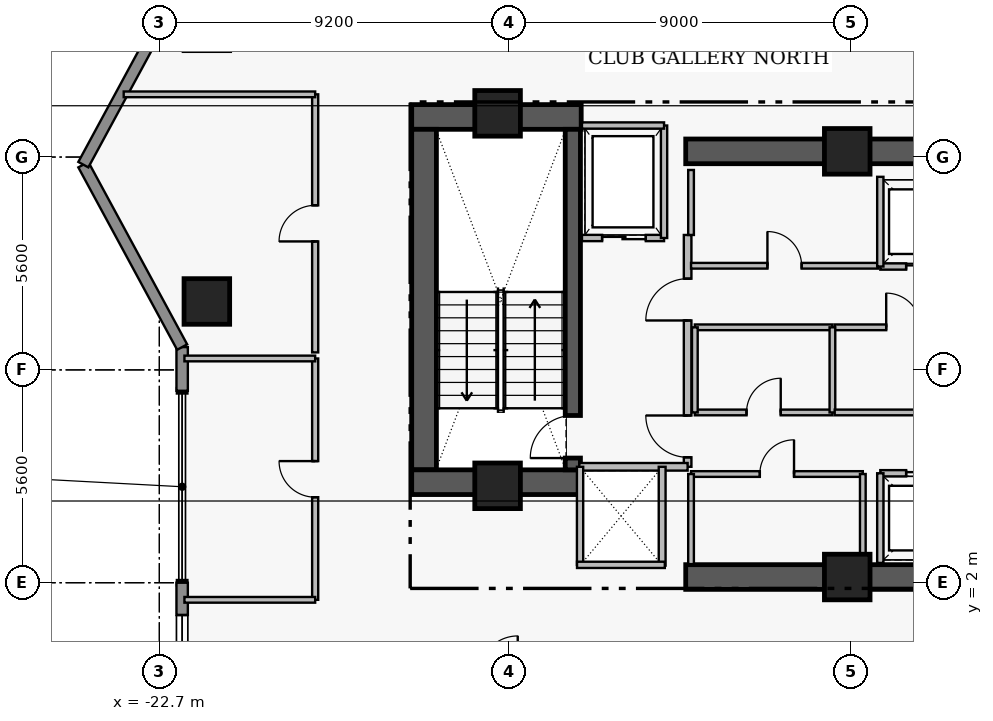
"""IFC4 building model, lengths in metres.
Left out: names, types, materials, properties, quantities, classifications, styles, units other than length and angle.
Written with IfcOpenShell. Run it as: python <this file> out.ifc"""

import sys

from ifc_helpers import new_model, si_unit, direction, frame, frame_2d, origin, origin_2d, place, context, subcontext, project, spatial, rectangle, extrude, element, fill, save


model = new_model("IFC4")
c1 = context("Model", 3, precision=1e-05, world=origin(), true_north=direction((0.0, 1.0)))
c2 = subcontext(c1, "Body", "Model", "MODEL_VIEW")
j1 = project(units=[si_unit("LENGTHUNIT", "METRE"), si_unit("PLANEANGLEUNIT", "RADIAN")], contexts=[c1])
p1 = place(None, origin())
s1 = spatial("IfcSite", under=j1, at=p1, CompositionType="ELEMENT")
p2 = place(p1, origin())
s2 = spatial("IfcBuilding", under=s1, at=p2, CompositionType="ELEMENT")
p3 = place(p2, frame((0.0, 0.0, 203.65)))
s3 = spatial("IfcBuildingStorey", under=s2, at=p3, CompositionType="ELEMENT", Elevation=203.65)
p4 = place(p3, frame((-16.06, 14.255, 0.0), z_axis=(0.0, 0.0, 1.0), x_axis=(1.0, 0.0, 0.0)))
e1 = element("IfcWall", 1, at=p4, inside=s3, PredefinedType="SHEAR", context=c2, shape_type="SweptSolid", body=[
    extrude(rectangle(XDim=4.46, YDim=0.65, at=frame_2d((2.23, 0.0))), origin(), (0.0, 0.0, 1.0), 3.56),
])
p5 = place(p3, frame((-15.735, 4.97, 0.0), z_axis=(0.0, 0.0, 1.0), x_axis=(0.0, 1.0, 0.0)))
e2 = element("IfcWall", 2, at=p5, inside=s3, PredefinedType="SHEAR", context=c2, shape_type="SweptSolid", body=[
    extrude(rectangle(XDim=8.96, YDim=0.65, at=frame_2d((4.48, 0.0))), origin(), (0.0, 0.0, 1.0), 3.56),
])
p6 = place(p3, frame((-16.06, 4.645, 0.0), z_axis=(0.0, 0.0, 1.0), x_axis=(1.0, 0.0, 0.0)))
e3 = element("IfcWall", 3, at=p6, inside=s3, PredefinedType="SHEAR", context=c2, shape_type="SweptSolid", body=[
    extrude(rectangle(XDim=4.46, YDim=0.65, at=frame_2d((2.23, 0.0))), origin(), (0.0, 0.0, 1.0), 3.56),
])
for number, where, z_axis, x_axis in (
    (4, (-8.85, 2.15, 0.0), (0.0, 0.0, 1.0), (1.0, 0.0, 0.0)),
    (5, (-8.85, 13.35, 0.0), (0.0, 0.0, 1.0), (1.0, 0.0, 0.0)),
):
    element("IfcWall", number, at=place(p3, frame(where, z_axis=z_axis, x_axis=x_axis)), inside=s3, PredefinedType="SHEAR", context=c2, shape_type="SweptSolid", body=[
        extrude(rectangle(XDim=7.6, YDim=0.65, at=frame_2d((3.8, 0.0))), origin(), (0.0, 0.0, 1.0), 3.53),
    ])
p7 = place(p3, frame((-11.82, 4.97, 0.0), z_axis=(0.0, 0.0, 1.0), x_axis=(0.0, 1.0, 0.0)))
e6 = element("IfcWall", 6, at=p7, inside=s3, PredefinedType="SHEAR", context=c2, shape_type="SweptSolid", body=[
    extrude(rectangle(XDim=8.96, YDim=0.4, at=frame_2d((4.48, 0.0))), origin(), (0.0, 0.0, 1.0), 3.56),
])
p8 = place(p7, frame((0.31, 0.0, 0.0)))
e7 = element("IfcOpeningElement", 7, at=p8, cuts=e6, PredefinedType="OPENING", context=c2, shape_type="SweptSolid", body=[
    extrude(rectangle(XDim=1.12, YDim=2.22, at=frame_2d((0.56, 1.11))), frame((0.0, 0.21, 0.0), z_axis=(0.0, -1.0, 0.0), x_axis=(1.0, 0.0, 0.0)), (0.0, 0.0, 1.0), 0.42),
])
for number, where, z_axis, x_axis in (
    (8, (-13.8, 14.35, 0.0), (0.0, 0.0, 1.0), (1.0, 0.0, 0.0)),
    (9, (-4.6, 13.35, 0.0), (0.0, 0.0, 1.0), (1.0, 0.0, 0.0)),
    (10, (-13.8, 4.55, 0.0), (0.0, 0.0, 1.0), (1.0, 0.0, 0.0)),
    (11, (-4.6, 2.15, 0.0), (0.0, 0.0, 1.0), (1.0, 0.0, 0.0)),
    (12, (-21.45, 9.4, 0.0), (0.0, 0.0, 1.0), (1.0, 0.0, 0.0)),
):
    element("IfcColumn", number, at=place(p3, frame(where, z_axis=z_axis, x_axis=x_axis)), inside=s3, PredefinedType="COLUMN", context=c2, shape_type="SweptSolid", body=[
        extrude(rectangle(XDim=1.2, YDim=1.2, at=origin_2d()), origin(), (0.0, 0.0, 1.0), 3.75),
    ])
p9 = place(p3, frame((-22.1, -4.2, 0.0), z_axis=(0.0, 0.0, 1.0), x_axis=(0.0, 1.0, 0.0)))
e13 = element("IfcWall", 13, at=p9, inside=s3, PredefinedType="STANDARD", context=c2, shape_type="SweptSolid", body=[
    extrude(rectangle(XDim=6.2, YDim=0.3, at=frame_2d((3.1, 0.0))), origin(), (0.0, 0.0, 1.0), 3.53),
])
p10 = place(p9, frame((2.045, 0.0, 0.95)))
e14 = element("IfcOpeningElement", 14, at=p10, cuts=e13, PredefinedType="OPENING", context=c2, shape_type="SweptSolid", body=[
    extrude(rectangle(XDim=1.15, YDim=1.55, at=frame_2d((0.575, 0.775))), frame((0.0, 0.16, 0.0), z_axis=(0.0, -1.0, 0.0), x_axis=(1.0, 0.0, 0.0)), (0.0, 0.0, 1.0), 0.32),
])
p11 = place(p9, frame((4.2, 0.0, 0.95)))
e15 = element("IfcOpeningElement", 15, at=p11, cuts=e13, PredefinedType="OPENING", context=c2, shape_type="SweptSolid", body=[
    extrude(rectangle(XDim=1.15, YDim=1.55, at=frame_2d((0.575, 0.775))), frame((0.0, 0.16, 0.0), z_axis=(0.0, -1.0, 0.0), x_axis=(1.0, 0.0, 0.0)), (0.0, 0.0, 1.0), 0.32),
])
p12 = place(p3, frame((-22.1, 7.05, 0.0), z_axis=(0.0, 0.0, 1.0), x_axis=(0.0, 1.0, 0.0)))
e16 = element("IfcWall", 16, at=p12, inside=s3, PredefinedType="STANDARD", context=c2, shape_type="SweptSolid", body=[
    extrude(rectangle(XDim=1.15, YDim=0.3, at=frame_2d((0.575, 0.0))), origin(), (0.0, 0.0, 1.0), 3.53),
])
for number, where, z_axis, x_axis in (
    (17, (-22.1, 8.2, 0.0), (0.0, 0.0, 1.0), (-0.476, 0.879, 0.0)),
    (18, (-24.7, 13.0, 0.0), (0.0, 0.0, 1.0), (0.476, 0.879, 0.0)),
):
    element("IfcWall", number, at=place(p3, frame(where, z_axis=z_axis, x_axis=x_axis)), inside=s3, PredefinedType="STANDARD", context=c2, shape_type="SweptSolid", body=[
        extrude(rectangle(XDim=5.459, YDim=0.3, at=frame_2d((2.729, 0.0))), origin(), (0.0, 0.0, 1.0), 3.53),
    ])
p13 = place(p3, frame((-8.8, 5.05, 0.0), z_axis=(0.0, 0.0, 1.0), x_axis=(0.0, 1.0, 0.0)))
e19 = element("IfcWall", 19, at=p13, inside=s3, PredefinedType="PARTITIONING", context=c2, shape_type="SweptSolid", body=[
    extrude(rectangle(XDim=6.1, YDim=0.2, at=frame_2d((3.05, 0.0))), origin(), (0.0, 0.0, 1.0), 3.53),
])
p14 = place(p13, frame((0.25, 0.0, 0.0)))
e20 = element("IfcOpeningElement", 20, at=p14, cuts=e19, PredefinedType="OPENING", context=c2, shape_type="SweptSolid", body=[
    extrude(rectangle(XDim=1.1, YDim=2.2, at=frame_2d((0.55, 1.1))), frame((0.0, 0.11, 0.0), z_axis=(0.0, -1.0, 0.0), x_axis=(1.0, 0.0, 0.0)), (0.0, 0.0, 1.0), 0.22),
])
p15 = place(p13, frame((3.85, 0.0, 0.0)))
e21 = element("IfcOpeningElement", 21, at=p15, cuts=e19, PredefinedType="OPENING", context=c2, shape_type="SweptSolid", body=[
    extrude(rectangle(XDim=1.1, YDim=2.2, at=frame_2d((0.55, 1.1))), frame((0.0, 0.11, 0.0), z_axis=(0.0, -1.0, 0.0), x_axis=(1.0, 0.0, 0.0)), (0.0, 0.0, 1.0), 0.22),
])
p16 = place(p3, frame((-11.58, 11.07, 0.0), z_axis=(0.0, 0.0, 1.0), x_axis=(1.0, 0.0, 0.0)))
e22 = element("IfcWall", 22, at=p16, inside=s3, PredefinedType="PARTITIONING", context=c2, shape_type="SweptSolid", body=[
    extrude(rectangle(XDim=2.16, YDim=0.165, at=frame_2d((1.08, 0.0))), origin(), (0.0, 0.0, 1.0), 3.53),
])
p17 = place(p16, frame((0.53, 0.0, 0.0)))
e23 = element("IfcOpeningElement", 23, at=p17, cuts=e22, PredefinedType="OPENING", context=c2, shape_type="SweptSolid", body=[
    extrude(rectangle(XDim=1.15, YDim=2.25, at=frame_2d((0.575, 1.125))), frame((0.0, 0.093, 0.0), z_axis=(0.0, -1.0, 0.0), x_axis=(1.0, 0.0, 0.0)), (0.0, 0.0, 1.0), 0.185),
])
p18 = place(p3, frame((-3.73, 4.88, 0.0), z_axis=(0.0, 0.0, 1.0), x_axis=(1.0, 0.0, 0.0)))
e24 = element("IfcWall", 24, at=p18, inside=s3, PredefinedType="PARTITIONING", context=c2, shape_type="SweptSolid", body=[
    extrude(rectangle(XDim=2.46, YDim=0.165, at=frame_2d((1.23, 0.0))), origin(), (0.0, 0.0, 1.0), 3.53),
])
p19 = place(p18, frame((0.68, 0.0, 0.0)))
e25 = element("IfcOpeningElement", 25, at=p19, cuts=e24, PredefinedType="OPENING", context=c2, shape_type="SweptSolid", body=[
    extrude(rectangle(XDim=1.1, YDim=2.25, at=frame_2d((0.55, 1.125))), frame((0.0, 0.093, 0.0), z_axis=(0.0, -1.0, 0.0), x_axis=(1.0, 0.0, 0.0)), (0.0, 0.0, 1.0), 0.185),
])
p20 = place(p3, frame((-3.73, 10.32, 0.0), z_axis=(0.0, 0.0, 1.0), x_axis=(1.0, 0.0, 0.0)))
e26 = element("IfcWall", 26, at=p20, inside=s3, PredefinedType="PARTITIONING", context=c2, shape_type="SweptSolid", body=[
    extrude(rectangle(XDim=2.46, YDim=0.165, at=frame_2d((1.23, 0.0))), origin(), (0.0, 0.0, 1.0), 3.53),
])
p21 = place(p20, frame((0.68, 0.0, 0.0)))
e27 = element("IfcOpeningElement", 27, at=p21, cuts=e26, PredefinedType="OPENING", context=c2, shape_type="SweptSolid", body=[
    extrude(rectangle(XDim=1.1, YDim=2.25, at=frame_2d((0.55, 1.125))), frame((0.0, 0.093, 0.0), z_axis=(0.0, -1.0, 0.0), x_axis=(1.0, 0.0, 0.0)), (0.0, 0.0, 1.0), 0.185),
])
p22 = place(p3, frame((-8.71, 4.86, 0.0), z_axis=(0.0, 0.0, 1.0), x_axis=(1.0, 0.0, 0.0)))
e28 = element("IfcWall", 28, at=p22, inside=s3, PredefinedType="PARTITIONING", context=c2, shape_type="SweptSolid", body=[
    extrude(rectangle(XDim=4.52, YDim=0.15, at=frame_2d((2.26, 0.0))), origin(), (0.0, 0.0, 1.0), 3.53),
])
p23 = place(p22, frame((1.81, 0.0, 0.0)))
e29 = element("IfcOpeningElement", 29, at=p23, cuts=e28, PredefinedType="OPENING", context=c2, shape_type="SweptSolid", body=[
    extrude(rectangle(XDim=0.9, YDim=2.15, at=frame_2d((0.45, 1.075))), frame((0.0, 0.085, 0.0), z_axis=(0.0, -1.0, 0.0), x_axis=(1.0, 0.0, 0.0)), (0.0, 0.0, 1.0), 0.17),
])
p24 = place(p3, frame((-8.71, 10.34, 0.0), z_axis=(0.0, 0.0, 1.0), x_axis=(1.0, 0.0, 0.0)))
e30 = element("IfcWall", 30, at=p24, inside=s3, PredefinedType="PARTITIONING", context=c2, shape_type="SweptSolid", body=[
    extrude(rectangle(XDim=4.92, YDim=0.15, at=frame_2d((2.46, 0.0))), origin(), (0.0, 0.0, 1.0), 3.53),
])
p25 = place(p24, frame((2.01, 0.0, 0.0)))
e31 = element("IfcOpeningElement", 31, at=p25, cuts=e30, PredefinedType="OPENING", context=c2, shape_type="SweptSolid", body=[
    extrude(rectangle(XDim=0.9, YDim=2.15, at=frame_2d((0.45, 1.075))), frame((0.0, 0.085, 0.0), z_axis=(0.0, -1.0, 0.0), x_axis=(1.0, 0.0, 0.0)), (0.0, 0.0, 1.0), 0.17),
])
p26 = place(p3, frame((-8.61, 6.48, 0.0), z_axis=(0.0, 0.0, 1.0), x_axis=(1.0, 0.0, 0.0)))
e32 = element("IfcWall", 32, at=p26, inside=s3, PredefinedType="PARTITIONING", context=c2, shape_type="SweptSolid", body=[
    extrude(rectangle(XDim=3.62, YDim=0.15, at=frame_2d((1.81, 0.0))), origin(), (0.0, 0.0, 1.0), 3.53),
])
p27 = place(p26, frame((1.36, 0.0, 0.0)))
e33 = element("IfcOpeningElement", 33, at=p27, cuts=e32, PredefinedType="OPENING", context=c2, shape_type="SweptSolid", body=[
    extrude(rectangle(XDim=0.9, YDim=2.15, at=frame_2d((0.45, 1.075))), frame((0.0, 0.085, 0.0), z_axis=(0.0, -1.0, 0.0), x_axis=(1.0, 0.0, 0.0)), (0.0, 0.0, 1.0), 0.17),
])
p28 = place(p3, frame((-4.93, 8.72, 0.0), z_axis=(0.0, 0.0, 1.0), x_axis=(1.0, 0.0, 0.0)))
e34 = element("IfcWall", 34, at=p28, inside=s3, PredefinedType="PARTITIONING", context=c2, shape_type="SweptSolid", body=[
    extrude(rectangle(XDim=3.61, YDim=0.15, at=frame_2d((1.805, 0.0))), origin(), (0.0, 0.0, 1.0), 3.53),
])
p29 = place(p28, frame((1.355, 0.0, 0.0)))
e35 = element("IfcOpeningElement", 35, at=p29, cuts=e34, PredefinedType="OPENING", context=c2, shape_type="SweptSolid", body=[
    extrude(rectangle(XDim=0.9, YDim=2.15, at=frame_2d((0.45, 1.075))), frame((0.0, 0.085, 0.0), z_axis=(0.0, -1.0, 0.0), x_axis=(1.0, 0.0, 0.0)), (0.0, 0.0, 1.0), 0.17),
])
p30 = place(p3, frame((-18.6, 1.55, 0.0), z_axis=(0.0, 0.0, 1.0), x_axis=(0.0, 1.0, 0.0)))
e36 = element("IfcWall", 36, at=p30, inside=s3, PredefinedType="PARTITIONING", context=c2, shape_type="SweptSolid", body=[
    extrude(rectangle(XDim=6.35, YDim=0.16, at=frame_2d((3.175, 0.0))), origin(), (0.0, 0.0, 1.0), 3.53),
])
p31 = place(p30, frame((2.7, 0.0, 0.0)))
e37 = element("IfcOpeningElement", 37, at=p31, cuts=e36, PredefinedType="OPENING", context=c2, shape_type="SweptSolid", body=[
    extrude(rectangle(XDim=0.95, YDim=2.15, at=frame_2d((0.475, 1.075))), frame((0.0, 0.09, 0.0), z_axis=(0.0, -1.0, 0.0), x_axis=(1.0, 0.0, 0.0)), (0.0, 0.0, 1.0), 0.18),
])
p32 = place(p3, frame((-18.6, 8.06, 0.0), z_axis=(0.0, 0.0, 1.0), x_axis=(0.0, 1.0, 0.0)))
e38 = element("IfcWall", 38, at=p32, inside=s3, PredefinedType="PARTITIONING", context=c2, shape_type="SweptSolid", body=[
    extrude(rectangle(XDim=6.79, YDim=0.16, at=frame_2d((3.395, 0.0))), origin(), (0.0, 0.0, 1.0), 3.53),
])
p33 = place(p32, frame((2.92, 0.0, 0.0)))
e39 = element("IfcOpeningElement", 39, at=p33, cuts=e38, PredefinedType="OPENING", context=c2, shape_type="SweptSolid", body=[
    extrude(rectangle(XDim=0.95, YDim=2.15, at=frame_2d((0.475, 1.075))), frame((0.0, 0.09, 0.0), z_axis=(0.0, -1.0, 0.0), x_axis=(1.0, 0.0, 0.0)), (0.0, 0.0, 1.0), 0.18),
])
p34 = place(p3, frame((-11.65, 5.05, 0.0), z_axis=(0.0, 0.0, 1.0), x_axis=(1.0, 0.0, 0.0)))
e40 = element("IfcWall", 40, at=p34, inside=s3, PredefinedType="PARTITIONING", context=c2, shape_type="SweptSolid", body=[
    extrude(rectangle(XDim=2.85, YDim=0.2, at=frame_2d((1.425, 0.0))), origin(), (0.0, 0.0, 1.0), 3.53),
])
p35 = place(p3, frame((-9.42, 11.07, 0.0), z_axis=(0.0, 0.0, 1.0), x_axis=(0.0, 1.0, 0.0)))
e41 = element("IfcWall", 41, at=p35, inside=s3, PredefinedType="PARTITIONING", context=c2, shape_type="SweptSolid", body=[
    extrude(rectangle(XDim=2.96, YDim=0.165, at=frame_2d((1.48, 0.0))), origin(), (0.0, 0.0, 1.0), 3.53),
])
p36 = place(p3, frame((-11.58, 14.03, 0.0), z_axis=(0.0, 0.0, 1.0), x_axis=(1.0, 0.0, 0.0)))
e42 = element("IfcWall", 42, at=p36, inside=s3, PredefinedType="PARTITIONING", context=c2, shape_type="SweptSolid", body=[
    extrude(rectangle(XDim=2.16, YDim=0.165, at=frame_2d((1.08, 0.0))), origin(), (0.0, 0.0, 1.0), 3.53),
])
for number, where, z_axis, x_axis in (
    (43, (-3.73, 2.52, 0.0), (0.0, 0.0, 1.0), (0.0, 1.0, 0.0)),
    (44, (-3.73, 10.32, 0.0), (0.0, 0.0, 1.0), (0.0, 1.0, 0.0)),
):
    element("IfcWall", number, at=place(p3, frame(where, z_axis=z_axis, x_axis=x_axis)), inside=s3, PredefinedType="PARTITIONING", context=c2, shape_type="SweptSolid", body=[
        extrude(rectangle(XDim=2.36, YDim=0.165, at=frame_2d((1.18, 0.0))), origin(), (0.0, 0.0, 1.0), 3.53),
    ])
for number, where, z_axis, x_axis in (
    (45, (-8.71, 2.49, 0.0), (0.0, 0.0, 1.0), (0.0, 1.0, 0.0)),
    (46, (-4.19, 2.49, 0.0), (0.0, 0.0, 1.0), (0.0, 1.0, 0.0)),
):
    element("IfcWall", number, at=place(p3, frame(where, z_axis=z_axis, x_axis=x_axis)), inside=s3, PredefinedType="PARTITIONING", context=c2, shape_type="SweptSolid", body=[
        extrude(rectangle(XDim=2.37, YDim=0.15, at=frame_2d((1.185, 0.0))), origin(), (0.0, 0.0, 1.0), 3.53),
    ])
p37 = place(p3, frame((-8.71, 11.15, 0.0), z_axis=(0.0, 0.0, 1.0), x_axis=(0.0, 1.0, 0.0)))
e47 = element("IfcWall", 47, at=p37, inside=s3, PredefinedType="PARTITIONING", context=c2, shape_type="SweptSolid", body=[
    extrude(rectangle(XDim=1.71, YDim=0.15, at=frame_2d((0.855, 0.0))), origin(), (0.0, 0.0, 1.0), 3.53),
])
p38 = place(p3, frame((-9.47, 2.45, 0.0), z_axis=(0.0, 0.0, 1.0), x_axis=(0.0, 1.0, 0.0)))
e48 = element("IfcWall", 48, at=p38, inside=s3, PredefinedType="PARTITIONING", context=c2, shape_type="SweptSolid", body=[
    extrude(rectangle(XDim=2.6, YDim=0.18, at=frame_2d((1.3, 0.0))), origin(), (0.0, 0.0, 1.0), 3.53),
])
p39 = place(p3, frame((-11.63, 2.47, 0.0), z_axis=(0.0, 0.0, 1.0), x_axis=(0.0, 1.0, 0.0)))
e49 = element("IfcWall", 49, at=p39, inside=s3, PredefinedType="PARTITIONING", context=c2, shape_type="SweptSolid", body=[
    extrude(rectangle(XDim=2.58, YDim=0.165, at=frame_2d((1.29, 0.0))), origin(), (0.0, 0.0, 1.0), 3.53),
])
p40 = place(p3, frame((-11.71, 2.47, 0.0), z_axis=(0.0, 0.0, 1.0), x_axis=(1.0, 0.0, 0.0)))
e50 = element("IfcWall", 50, at=p40, inside=s3, PredefinedType="PARTITIONING", context=c2, shape_type="SweptSolid", body=[
    extrude(rectangle(XDim=2.31, YDim=0.165, at=frame_2d((1.155, 0.0))), origin(), (0.0, 0.0, 1.0), 2.43),
])
p41 = place(p3, frame((-8.61, 8.72, 0.0), z_axis=(0.0, 0.0, 1.0), x_axis=(1.0, 0.0, 0.0)))
e51 = element("IfcWall", 51, at=p41, inside=s3, PredefinedType="PARTITIONING", context=c2, shape_type="SweptSolid", body=[
    extrude(rectangle(XDim=3.62, YDim=0.15, at=frame_2d((1.81, 0.0))), origin(), (0.0, 0.0, 1.0), 3.53),
])
for number, where, z_axis, x_axis in (
    (52, (-8.61, 6.48, 0.0), (0.0, 0.0, 1.0), (0.0, 1.0, 0.0)),
    (53, (-4.99, 6.48, 0.0), (0.0, 0.0, 1.0), (0.0, 1.0, 0.0)),
):
    element("IfcWall", number, at=place(p3, frame(where, z_axis=z_axis, x_axis=x_axis)), inside=s3, PredefinedType="PARTITIONING", context=c2, shape_type="SweptSolid", body=[
        extrude(rectangle(XDim=2.24, YDim=0.15, at=frame_2d((1.12, 0.0))), origin(), (0.0, 0.0, 1.0), 3.53),
    ])
p42 = place(p3, frame((-4.93, 6.48, 0.0), z_axis=(0.0, 0.0, 1.0), x_axis=(1.0, 0.0, 0.0)))
e54 = element("IfcWall", 54, at=p42, inside=s3, PredefinedType="PARTITIONING", context=c2, shape_type="SweptSolid", body=[
    extrude(rectangle(XDim=3.61, YDim=0.15, at=frame_2d((1.805, 0.0))), origin(), (0.0, 0.0, 1.0), 3.53),
])
for number, where, z_axis, x_axis in (
    (55, (-22.04, 1.55, 0.0), (0.0, 0.0, 1.0), (1.0, 0.0, 0.0)),
    (56, (-22.04, 7.9, 0.0), (0.0, 0.0, 1.0), (1.0, 0.0, 0.0)),
):
    element("IfcWall", number, at=place(p3, frame(where, z_axis=z_axis, x_axis=x_axis)), inside=s3, PredefinedType="PARTITIONING", context=c2, shape_type="SweptSolid", body=[
        extrude(rectangle(XDim=3.44, YDim=0.15, at=frame_2d((1.72, 0.0))), origin(), (0.0, 0.0, 1.0), 3.53),
    ])
p43 = place(p3, frame((-23.638, 14.85, 0.0), z_axis=(0.0, 0.0, 1.0), x_axis=(1.0, 0.0, 0.0)))
e57 = element("IfcWall", 57, at=p43, inside=s3, PredefinedType="PARTITIONING", context=c2, shape_type="SweptSolid", body=[
    extrude(rectangle(XDim=5.038, YDim=0.15, at=frame_2d((2.519, 0.0))), origin(), (0.0, 0.0, 1.0), 3.53),
])
p44 = place(p11, origin())
e58 = element("IfcWindow", 58, at=p44, inside=s3, PartitioningType="SINGLE_PANEL", PredefinedType="WINDOW", context=c2, shape_type="SweptSolid", body=[
    extrude(rectangle(XDim=1.15, YDim=1.55, at=frame_2d((0.575, 0.775))), frame((0.0, 0.03, 0.0), z_axis=(0.0, -1.0, 0.0), x_axis=(1.0, 0.0, 0.0)), (0.0, 0.0, 1.0), 0.06),
])
fill(e15, e58)
p45 = place(p8, origin())
e59 = element("IfcDoor", 59, at=p45, inside=s3, OperationType="SINGLE_SWING_LEFT", PredefinedType="DOOR", context=c2, shape_type="SweptSolid", body=[
    extrude(rectangle(XDim=1.12, YDim=2.22, at=frame_2d((0.56, 1.11))), frame((0.0, 0.025, 0.0), z_axis=(0.0, -1.0, 0.0), x_axis=(1.0, 0.0, 0.0)), (0.0, 0.0, 1.0), 0.05),
])
fill(e7, e59)
p46 = place(p14, origin())
e60 = element("IfcDoor", 60, at=p46, inside=s3, OperationType="SINGLE_SWING_RIGHT", PredefinedType="DOOR", context=c2, shape_type="SweptSolid", body=[
    extrude(rectangle(XDim=1.1, YDim=2.2, at=frame_2d((0.55, 1.1))), frame((0.0, 0.025, 0.0), z_axis=(0.0, -1.0, 0.0), x_axis=(1.0, 0.0, 0.0)), (0.0, 0.0, 1.0), 0.05),
])
fill(e20, e60)
p47 = place(p15, origin())
e61 = element("IfcDoor", 61, at=p47, inside=s3, OperationType="SINGLE_SWING_LEFT", PredefinedType="DOOR", context=c2, shape_type="SweptSolid", body=[
    extrude(rectangle(XDim=1.1, YDim=2.2, at=frame_2d((0.55, 1.1))), frame((0.0, 0.025, 0.0), z_axis=(0.0, -1.0, 0.0), x_axis=(1.0, 0.0, 0.0)), (0.0, 0.0, 1.0), 0.05),
])
fill(e21, e61)
p48 = place(p17, origin())
e62 = element("IfcDoor", 62, at=p48, inside=s3, OperationType="SLIDING_TO_LEFT", PredefinedType="DOOR", context=c2, shape_type="SweptSolid", body=[
    extrude(rectangle(XDim=1.15, YDim=2.25, at=frame_2d((0.575, 1.125))), frame((0.0, 0.025, 0.0), z_axis=(0.0, -1.0, 0.0), x_axis=(1.0, 0.0, 0.0)), (0.0, 0.0, 1.0), 0.05),
])
fill(e23, e62)
p49 = place(p19, origin())
e63 = element("IfcDoor", 63, at=p49, inside=s3, OperationType="SLIDING_TO_LEFT", PredefinedType="DOOR", context=c2, shape_type="SweptSolid", body=[
    extrude(rectangle(XDim=1.1, YDim=2.25, at=frame_2d((0.55, 1.125))), frame((0.0, 0.025, 0.0), z_axis=(0.0, -1.0, 0.0), x_axis=(1.0, 0.0, 0.0)), (0.0, 0.0, 1.0), 0.05),
])
fill(e25, e63)
p50 = place(p21, origin())
e64 = element("IfcDoor", 64, at=p50, inside=s3, OperationType="SLIDING_TO_LEFT", PredefinedType="DOOR", context=c2, shape_type="SweptSolid", body=[
    extrude(rectangle(XDim=1.1, YDim=2.25, at=frame_2d((0.55, 1.125))), frame((0.0, 0.025, 0.0), z_axis=(0.0, -1.0, 0.0), x_axis=(1.0, 0.0, 0.0)), (0.0, 0.0, 1.0), 0.05),
])
fill(e27, e64)
p51 = place(p23, origin())
e65 = element("IfcDoor", 65, at=p51, inside=s3, OperationType="SINGLE_SWING_RIGHT", PredefinedType="DOOR", context=c2, shape_type="SweptSolid", body=[
    extrude(rectangle(XDim=0.9, YDim=2.15, at=frame_2d((0.45, 1.075))), frame((0.0, 0.025, 0.0), z_axis=(0.0, -1.0, 0.0), x_axis=(1.0, 0.0, 0.0)), (0.0, 0.0, 1.0), 0.05),
])
fill(e29, e65)
p52 = place(p25, origin())
e66 = element("IfcDoor", 66, at=p52, inside=s3, OperationType="SINGLE_SWING_LEFT", PredefinedType="DOOR", context=c2, shape_type="SweptSolid", body=[
    extrude(rectangle(XDim=0.9, YDim=2.15, at=frame_2d((0.45, 1.075))), frame((0.0, 0.025, 0.0), z_axis=(0.0, -1.0, 0.0), x_axis=(1.0, 0.0, 0.0)), (0.0, 0.0, 1.0), 0.05),
])
fill(e31, e66)
p53 = place(p27, origin())
e67 = element("IfcDoor", 67, at=p53, inside=s3, OperationType="SINGLE_SWING_RIGHT", PredefinedType="DOOR", context=c2, shape_type="SweptSolid", body=[
    extrude(rectangle(XDim=0.9, YDim=2.15, at=frame_2d((0.45, 1.075))), frame((0.0, 0.025, 0.0), z_axis=(0.0, -1.0, 0.0), x_axis=(1.0, 0.0, 0.0)), (0.0, 0.0, 1.0), 0.05),
])
fill(e33, e67)
p54 = place(p29, origin())
e68 = element("IfcDoor", 68, at=p54, inside=s3, OperationType="SINGLE_SWING_LEFT", PredefinedType="DOOR", context=c2, shape_type="SweptSolid", body=[
    extrude(rectangle(XDim=0.9, YDim=2.15, at=frame_2d((0.45, 1.075))), frame((0.0, 0.025, 0.0), z_axis=(0.0, -1.0, 0.0), x_axis=(1.0, 0.0, 0.0)), (0.0, 0.0, 1.0), 0.05),
])
fill(e35, e68)
p55 = place(p31, origin())
e69 = element("IfcDoor", 69, at=p55, inside=s3, OperationType="SINGLE_SWING_RIGHT", PredefinedType="DOOR", context=c2, shape_type="SweptSolid", body=[
    extrude(rectangle(XDim=0.95, YDim=2.15, at=frame_2d((0.475, 1.075))), frame((0.0, 0.025, 0.0), z_axis=(0.0, -1.0, 0.0), x_axis=(1.0, 0.0, 0.0)), (0.0, 0.0, 1.0), 0.05),
])
fill(e37, e69)
p56 = place(p33, origin())
e70 = element("IfcDoor", 70, at=p56, inside=s3, OperationType="SINGLE_SWING_LEFT", PredefinedType="DOOR", context=c2, shape_type="SweptSolid", body=[
    extrude(rectangle(XDim=0.95, YDim=2.15, at=frame_2d((0.475, 1.075))), frame((0.0, 0.025, 0.0), z_axis=(0.0, -1.0, 0.0), x_axis=(1.0, 0.0, 0.0)), (0.0, 0.0, 1.0), 0.05),
])
fill(e39, e70)
save(model, sys.argv[1])
